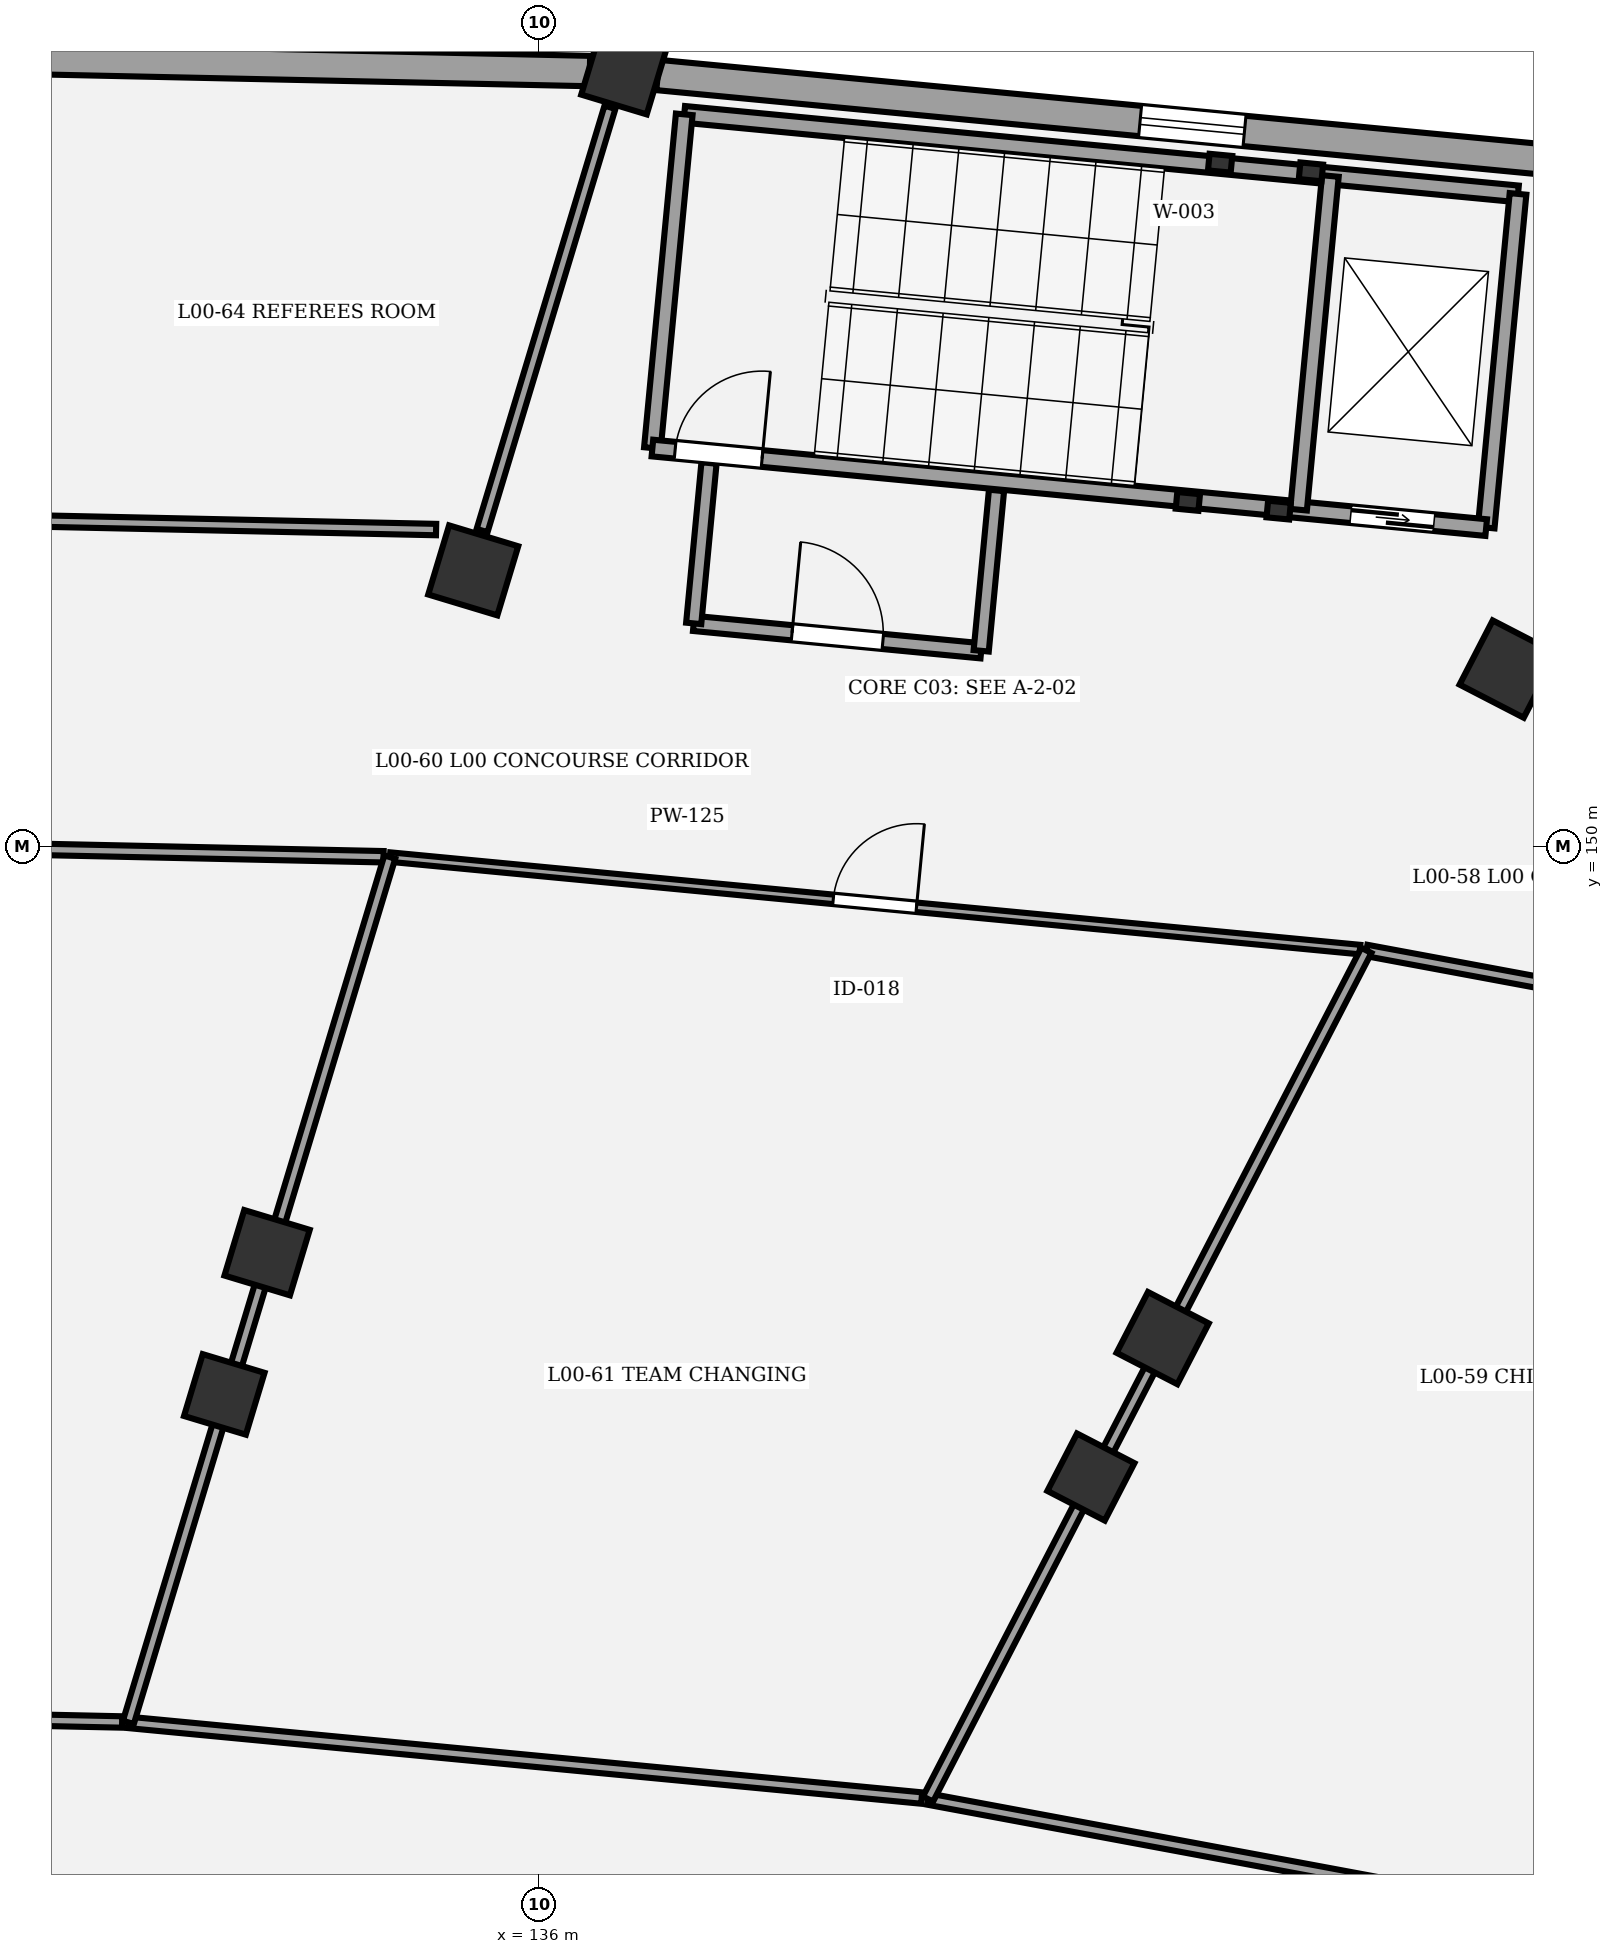
"""IFC4 building model, lengths in metres.
Left out: names, types, materials, properties, quantities, classifications, styles, units other than length and angle.
Written with IfcOpenShell. Run it as: python <this file> out.ifc"""

import sys

from ifc_helpers import new_model, si_unit, direction, frame, frame_2d, origin, origin_2d, place, context, subcontext, project, spatial, rectangle, extrude, element, fill, save


model = new_model("IFC4")
c1 = context("Model", 3, precision=1e-05, world=origin(), true_north=direction((0.0, 1.0)))
c2 = subcontext(c1, "Body", "Model", "MODEL_VIEW")
j1 = project(units=[si_unit("LENGTHUNIT", "METRE"), si_unit("PLANEANGLEUNIT", "RADIAN")], contexts=[c1])
p1 = place(None, origin())
s1 = spatial("IfcSite", under=j1, at=p1, CompositionType="ELEMENT")
p2 = place(p1, origin())
s2 = spatial("IfcBuilding", under=s1, at=p2, CompositionType="ELEMENT")
p3 = place(p2, origin())
s3 = spatial("IfcBuildingStorey", under=s2, at=p3, CompositionType="ELEMENT", Elevation=0.0)
p4 = place(p3, frame((143.259, 141.706, 0.0), z_axis=(0.0, 0.0, 1.0), x_axis=(0.458959712465, 0.888457079624, 0.0)))
e1 = element("IfcColumn", 1, at=p4, inside=s3, PredefinedType="COLUMN", context=c2, shape_type="SweptSolid", body=[
    extrude(rectangle(XDim=0.85, YDim=0.85, at=origin_2d()), origin(), (0.0, 0.0, 1.0), 5.4),
])
p5 = place(p3, frame((144.204, 143.534, 0.0), z_axis=(0.0, 0.0, 1.0), x_axis=(0.458959712465, 0.888457079624, 0.0)))
e2 = element("IfcColumn", 2, at=p5, inside=s3, PredefinedType="COLUMN", context=c2, shape_type="SweptSolid", body=[
    extrude(rectangle(XDim=0.9, YDim=0.9, at=origin_2d()), origin(), (0.0, 0.0, 1.0), 5.4),
])
p6 = place(p3, frame((148.75, 152.335, 0.0), z_axis=(0.0, 0.0, 1.0), x_axis=(0.458959712465, 0.888457079624, 0.0)))
e3 = element("IfcColumn", 3, at=p6, inside=s3, PredefinedType="COLUMN", context=c2, shape_type="SweptSolid", body=[
    extrude(rectangle(XDim=0.95, YDim=0.95, at=origin_2d()), origin(), (0.0, 0.0, 1.0), 5.4),
])
p7 = place(p3, frame((131.857, 142.793, 0.0), z_axis=(0.0, 0.0, 1.0), x_axis=(0.289198876314, 0.957269037387, 0.0)))
e4 = element("IfcColumn", 4, at=p7, inside=s3, PredefinedType="COLUMN", context=c2, shape_type="SweptSolid", body=[
    extrude(rectangle(XDim=0.85, YDim=0.85, at=origin_2d()), origin(), (0.0, 0.0, 1.0), 5.4),
])
p8 = place(p3, frame((132.42, 144.657, 0.0), z_axis=(0.0, 0.0, 1.0), x_axis=(0.289198876314, 0.957269037387, 0.0)))
e5 = element("IfcColumn", 5, at=p8, inside=s3, PredefinedType="COLUMN", context=c2, shape_type="SweptSolid", body=[
    extrude(rectangle(XDim=0.9, YDim=0.9, at=origin_2d()), origin(), (0.0, 0.0, 1.0), 5.4),
])
p9 = place(p3, frame((135.133, 153.634, 0.0), z_axis=(0.0, 0.0, 1.0), x_axis=(0.289198876314, 0.957269037387, 0.0)))
e6 = element("IfcColumn", 6, at=p9, inside=s3, PredefinedType="COLUMN", context=c2, shape_type="SweptSolid", body=[
    extrude(rectangle(XDim=0.95, YDim=0.95, at=origin_2d()), origin(), (0.0, 0.0, 1.0), 5.4),
])
p10 = place(p3, frame((137.115, 160.194, 0.0), z_axis=(0.0, 0.0, 1.0), x_axis=(0.289198876314, 0.957269037387, 0.0)))
e7 = element("IfcColumn", 7, at=p10, inside=s3, PredefinedType="COLUMN", context=c2, shape_type="SweptSolid", body=[
    extrude(rectangle(XDim=0.9, YDim=0.9, at=origin_2d()), origin(), (0.0, 0.0, 1.0), 5.4),
])
p11 = place(p3, frame((137.561, 160.151, 0.0), z_axis=(0.0, 0.0, 1.0), x_axis=(0.995482650467, -0.094943628644, 0.0)))
e8 = element("IfcWall", 8, at=p11, inside=s3, PredefinedType="STANDARD", context=c2, shape_type="SweptSolid", body=[
    extrude(rectangle(XDim=14.13, YDim=0.4, at=frame_2d((7.065, 0.0))), origin(), (0.0, 0.0, 1.0), 4.25),
])
p12 = place(p11, frame((6.375, 0.0, 1.1)))
e9 = element("IfcOpeningElement", 9, at=p12, cuts=e8, PredefinedType="OPENING", context=c2, shape_type="SweptSolid", body=[
    extrude(rectangle(XDim=1.38, YDim=1.55, at=frame_2d((0.69, 0.775))), frame((0.0, 0.21, 0.0), z_axis=(0.0, -1.0, 0.0), x_axis=(1.0, 0.0, 0.0)), (0.0, 0.0, 1.0), 0.42),
])
p13 = place(p3, frame((115.448, 160.66, 0.0), z_axis=(0.0, 0.0, 1.0), x_axis=(0.999768115817, -0.021534033422, 0.0)))
e10 = element("IfcWall", 10, at=p13, inside=s3, PredefinedType="STANDARD", context=c2, shape_type="SweptSolid", body=[
    extrude(rectangle(XDim=21.224, YDim=0.4, at=frame_2d((10.612, 0.0))), origin(), (0.0, 0.0, 1.0), 4.25),
])
p14 = place(p13, frame((9.012, 0.0, 0.0)))
e11 = element("IfcOpeningElement", 11, at=p14, cuts=e10, PredefinedType="OPENING", context=c2, shape_type="SweptSolid", body=[
    extrude(rectangle(XDim=3.2, YDim=3.1, at=frame_2d((1.6, 1.55))), frame((0.0, 0.21, 0.0), z_axis=(0.0, -1.0, 0.0), x_axis=(1.0, 0.0, 0.0)), (0.0, 0.0, 1.0), 0.42),
])
for number, where, z_axis, x_axis in (
    (12, (144.535, 154.541, 0.0), (0.0, 0.0, 1.0), (0.995, -0.095, 0.0)),
    (13, (145.73, 154.427, 0.0), (0.0, 0.0, 1.0), (0.995, -0.095, 0.0)),
    (14, (146.154, 158.877, 0.0), (0.0, 0.0, 1.0), (0.995, -0.095, 0.0)),
    (15, (144.96, 158.991, 0.0), (0.0, 0.0, 1.0), (0.995, -0.095, 0.0)),
):
    element("IfcColumn", number, at=place(p3, frame(where, z_axis=z_axis, x_axis=x_axis)), inside=s3, PredefinedType="COLUMN", context=c2, shape_type="SweptSolid", body=[
        extrude(rectangle(XDim=0.3, YDim=0.22, at=origin_2d()), origin(), (0.0, 0.0, 1.0), 5.4),
    ])
p15 = place(p3, frame((137.909, 159.634, 0.0), z_axis=(0.0, 0.0, 1.0), x_axis=(0.99547962713, -0.094975322952, 0.0)))
e16 = element("IfcWall", 16, at=p15, inside=s3, PredefinedType="SHEAR", context=c2, shape_type="SweptSolid", body=[
    extrude(rectangle(XDim=11.02, YDim=0.22, at=frame_2d((5.51, 0.0))), origin(), (0.0, 0.0, 1.0), 5.15),
])
p16 = place(p3, frame((137.49, 155.243, 0.0), z_axis=(0.0, 0.0, 1.0), x_axis=(0.094997189401, 0.995477540684, 0.0)))
e17 = element("IfcWall", 17, at=p16, inside=s3, PredefinedType="SHEAR", context=c2, shape_type="SweptSolid", body=[
    extrude(rectangle(XDim=4.41, YDim=0.22, at=frame_2d((2.205, 0.0))), origin(), (0.0, 0.0, 1.0), 5.15),
])
p17 = place(p3, frame((148.46, 154.197, 0.0), z_axis=(0.0, 0.0, 1.0), x_axis=(0.095002424918, 0.995477041051, 0.0)))
e18 = element("IfcWall", 18, at=p17, inside=s3, PredefinedType="SHEAR", context=c2, shape_type="SweptSolid", body=[
    extrude(rectangle(XDim=4.41, YDim=0.22, at=frame_2d((2.205, 0.0))), origin(), (0.0, 0.0, 1.0), 5.15),
])
p18 = place(p3, frame((137.49, 155.243, 0.0), z_axis=(0.0, 0.0, 1.0), x_axis=(0.995481721489, -0.094953368458, 0.0)))
e19 = element("IfcWall", 19, at=p18, inside=s3, PredefinedType="SHEAR", context=c2, shape_type="SweptSolid", body=[
    extrude(rectangle(XDim=11.02, YDim=0.22, at=frame_2d((5.51, 0.0))), origin(), (0.0, 0.0, 1.0), 5.15),
])
p19 = place(p18, frame((0.3, 0.0, 0.0)))
e20 = element("IfcOpeningElement", 20, at=p19, cuts=e19, PredefinedType="OPENING", context=c2, shape_type="SweptSolid", body=[
    extrude(rectangle(XDim=1.15, YDim=2.15, at=frame_2d((0.575, 1.075))), frame((0.0, 0.12, 0.0), z_axis=(0.0, -1.0, 0.0), x_axis=(1.0, 0.0, 0.0)), (0.0, 0.0, 1.0), 0.24),
])
p20 = place(p18, frame((9.23, 0.0, 0.0)))
e21 = element("IfcOpeningElement", 21, at=p20, cuts=e19, PredefinedType="OPENING", context=c2, shape_type="SweptSolid", body=[
    extrude(rectangle(XDim=1.1, YDim=2.15, at=frame_2d((0.55, 1.075))), frame((0.0, 0.12, 0.0), z_axis=(0.0, -1.0, 0.0), x_axis=(1.0, 0.0, 0.0)), (0.0, 0.0, 1.0), 0.24),
])
p21 = place(p3, frame((145.991, 154.432, 0.0), z_axis=(0.0, 0.0, 1.0), x_axis=(0.094997189401, 0.995477540684, 0.0)))
e22 = element("IfcWall", 22, at=p21, inside=s3, PredefinedType="SHEAR", context=c2, shape_type="SweptSolid", body=[
    extrude(rectangle(XDim=4.41, YDim=0.22, at=frame_2d((2.205, 0.0))), origin(), (0.0, 0.0, 1.0), 5.15),
])
p22 = place(p3, frame((138.033, 152.937, 0.0), z_axis=(0.0, 0.0, 1.0), x_axis=(0.995481022971, -0.094960691361, 0.0)))
e23 = element("IfcWall", 23, at=p22, inside=s3, PredefinedType="PARTITIONING", context=c2, shape_type="SweptSolid", body=[
    extrude(rectangle(XDim=3.8, YDim=0.2, at=frame_2d((1.9, 0.0))), origin(), (0.0, 0.0, 1.0), 4.25),
])
p23 = place(p22, frame((1.3, 0.0, 0.0)))
e24 = element("IfcOpeningElement", 24, at=p23, cuts=e23, PredefinedType="OPENING", context=c2, shape_type="SweptSolid", body=[
    extrude(rectangle(XDim=1.2, YDim=2.18, at=frame_2d((0.6, 1.09))), frame((0.0, 0.11, 0.0), z_axis=(0.0, -1.0, 0.0), x_axis=(1.0, 0.0, 0.0)), (0.0, 0.0, 1.0), 0.22),
])
for number, where, z_axis, x_axis in (
    (25, (138.033, 152.937, 0.0), (0.0, 0.0, 1.0), (0.095, 0.995, 0.0)),
    (26, (141.816, 152.576, 0.0), (0.0, 0.0, 1.0), (0.095, 0.995, 0.0)),
):
    element("IfcWall", number, at=place(p3, frame(where, z_axis=z_axis, x_axis=x_axis)), inside=s3, PredefinedType="PARTITIONING", context=c2, shape_type="SweptSolid", body=[
        extrude(rectangle(XDim=2.12, YDim=0.2, at=frame_2d((1.06, 0.0))), origin(), (0.0, 0.0, 1.0), 4.25),
    ])
p24 = place(p3, frame((146.884, 148.635, 0.0), z_axis=(0.0, 0.0, 1.0), x_axis=(0.983097372707, -0.183083466695, 0.0)))
e27 = element("IfcWall", 27, at=p24, inside=s3, PredefinedType="PARTITIONING", context=c2, shape_type="SweptSolid", body=[
    extrude(rectangle(XDim=11.035, YDim=0.15, at=frame_2d((5.517, 0.0))), origin(), (0.0, 0.0, 1.0), 4.15),
])
p25 = place(p24, frame((4.987, 0.0, 0.0)))
e28 = element("IfcOpeningElement", 28, at=p25, cuts=e27, PredefinedType="OPENING", context=c2, shape_type="SweptSolid", body=[
    extrude(rectangle(XDim=1.06, YDim=2.2, at=frame_2d((0.53, 1.1))), frame((0.0, 0.085, 0.0), z_axis=(0.0, -1.0, 0.0), x_axis=(1.0, 0.0, 0.0)), (0.0, 0.0, 1.0), 0.17),
])
p26 = place(p3, frame((134.035, 149.862, 0.0), z_axis=(0.0, 0.0, 1.0), x_axis=(0.995485111947, -0.094917816515, 0.0)))
e29 = element("IfcWall", 29, at=p26, inside=s3, PredefinedType="PARTITIONING", context=c2, shape_type="SweptSolid", body=[
    extrude(rectangle(XDim=12.822, YDim=0.125, at=frame_2d((6.411, 0.0))), origin(), (0.0, 0.0, 1.0), 4.15),
])
p27 = place(p26, frame((5.861, 0.0, 0.0)))
e30 = element("IfcOpeningElement", 30, at=p27, cuts=e29, PredefinedType="OPENING", context=c2, shape_type="SweptSolid", body=[
    extrude(rectangle(XDim=1.1, YDim=2.2, at=frame_2d((0.55, 1.1))), frame((0.0, 0.073, 0.0), z_axis=(0.0, -1.0, 0.0), x_axis=(1.0, 0.0, 0.0)), (0.0, 0.0, 1.0), 0.145),
])
p28 = place(p3, frame((115.04, 150.274, 0.0), z_axis=(0.0, 0.0, 1.0), x_axis=(0.999768266483, -0.021527037261, 0.0)))
e31 = element("IfcWall", 31, at=p28, inside=s3, PredefinedType="PARTITIONING", context=c2, shape_type="SweptSolid", body=[
    extrude(rectangle(XDim=18.917, YDim=0.15, at=frame_2d((9.458, 0.0))), origin(), (0.0, 0.0, 1.0), 4.15),
])
p29 = place(p28, frame((8.888, 0.0, 0.0)))
e32 = element("IfcOpeningElement", 32, at=p29, cuts=e31, PredefinedType="OPENING", context=c2, shape_type="SweptSolid", body=[
    extrude(rectangle(XDim=1.14, YDim=2.2, at=frame_2d((0.57, 1.1))), frame((0.0, 0.085, 0.0), z_axis=(0.0, -1.0, 0.0), x_axis=(1.0, 0.0, 0.0)), (0.0, 0.0, 1.0), 0.17),
])
p30 = place(p3, frame((134.644, 154.171, 0.0), z_axis=(0.0, 0.0, 1.0), x_axis=(-0.999768107727, 0.021534409017, 0.0)))
e33 = element("IfcWall", 33, at=p30, inside=s3, PredefinedType="PARTITIONING", context=c2, shape_type="SweptSolid", body=[
    extrude(rectangle(XDim=19.137, YDim=0.15, at=frame_2d((9.569, 0.0))), origin(), (0.0, 0.0, 1.0), 4.15),
])
p31 = place(p30, frame((8.979, 0.0, 0.0)))
e34 = element("IfcOpeningElement", 34, at=p31, cuts=e33, PredefinedType="OPENING", context=c2, shape_type="SweptSolid", body=[
    extrude(rectangle(XDim=1.18, YDim=2.2, at=frame_2d((0.59, 1.1))), frame((0.0, 0.085, 0.0), z_axis=(0.0, -1.0, 0.0), x_axis=(1.0, 0.0, 0.0)), (0.0, 0.0, 1.0), 0.17),
])
p32 = place(p3, frame((149.984, 135.818, 0.0), z_axis=(0.0, 0.0, 1.0), x_axis=(-0.983094830755, 0.183097115603, 0.0)))
e35 = element("IfcWall", 35, at=p32, inside=s3, PredefinedType="PARTITIONING", context=c2, shape_type="SweptSolid", body=[
    extrude(rectangle(XDim=9.021, YDim=0.15, at=frame_2d((4.51, 0.0))), origin(), (0.0, 0.0, 1.0), 4.15),
])
p33 = place(p3, frame((141.116, 137.47, 0.0), z_axis=(0.0, 0.0, 1.0), x_axis=(0.45894823356, 0.88846300931, 0.0)))
e36 = element("IfcWall", 36, at=p33, inside=s3, PredefinedType="PARTITIONING", context=c2, shape_type="SweptSolid", body=[
    extrude(rectangle(XDim=12.566, YDim=0.15, at=frame_2d((6.283, 0.0))), origin(), (0.0, 0.0, 1.0), 4.15),
])
p34 = place(p3, frame((141.033, 137.483, 0.0), z_axis=(0.0, 0.0, 1.0), x_axis=(-0.99548363917, 0.094933261529, 0.0)))
e37 = element("IfcWall", 37, at=p34, inside=s3, PredefinedType="PARTITIONING", context=c2, shape_type="SweptSolid", body=[
    extrude(rectangle(XDim=10.485, YDim=0.15, at=frame_2d((5.242, 0.0))), origin(), (0.0, 0.0, 1.0), 4.15),
])
p35 = place(p3, frame((130.595, 138.478, 0.0), z_axis=(0.0, 0.0, 1.0), x_axis=(0.289230709122, 0.957259419855, 0.0)))
e38 = element("IfcWall", 38, at=p35, inside=s3, PredefinedType="PARTITIONING", context=c2, shape_type="SweptSolid", body=[
    extrude(rectangle(XDim=11.893, YDim=0.15, at=frame_2d((5.946, 0.0))), origin(), (0.0, 0.0, 1.0), 4.15),
])
p36 = place(p3, frame((130.513, 138.483, 0.0), z_axis=(0.0, 0.0, 1.0), x_axis=(-0.999768149952, 0.021532448558, 0.0)))
e39 = element("IfcWall", 39, at=p36, inside=s3, PredefinedType="PARTITIONING", context=c2, shape_type="SweptSolid", body=[
    extrude(rectangle(XDim=15.477, YDim=0.15, at=frame_2d((7.738, 0.0))), origin(), (0.0, 0.0, 1.0), 4.15),
])
p37 = place(p3, frame((136.932, 159.727, 0.0), z_axis=(0.0, 0.0, 1.0), x_axis=(-0.289195444178, -0.957270074256, 0.0)))
e40 = element("IfcWall", 40, at=p37, inside=s3, PredefinedType="PARTITIONING", context=c2, shape_type="SweptSolid", body=[
    extrude(rectangle(XDim=5.817, YDim=0.15, at=frame_2d((2.909, 0.0))), origin(), (0.0, 0.0, 1.0), 4.15),
])
p38 = place(p12, origin())
e41 = element("IfcWindow", 41, at=p38, inside=s3, PartitioningType="SINGLE_PANEL", PredefinedType="WINDOW", context=c2, shape_type="SweptSolid", body=[
    extrude(rectangle(XDim=1.38, YDim=1.55, at=frame_2d((0.69, 0.775))), frame((0.0, 0.03, 0.0), z_axis=(0.0, -1.0, 0.0), x_axis=(1.0, 0.0, 0.0)), (0.0, 0.0, 1.0), 0.06),
])
fill(e9, e41)
p39 = place(p19, origin())
e42 = element("IfcDoor", 42, at=p39, inside=s3, OperationType="SINGLE_SWING_RIGHT", PredefinedType="DOOR", context=c2, shape_type="SweptSolid", body=[
    extrude(rectangle(XDim=1.15, YDim=2.15, at=frame_2d((0.575, 1.075))), frame((0.0, 0.025, 0.0), z_axis=(0.0, -1.0, 0.0), x_axis=(1.0, 0.0, 0.0)), (0.0, 0.0, 1.0), 0.05),
])
fill(e20, e42)
p40 = place(p20, origin())
e43 = element("IfcDoor", 43, at=p40, inside=s3, OperationType="DOUBLE_DOOR_SLIDING", PredefinedType="DOOR", context=c2, shape_type="SweptSolid", body=[
    extrude(rectangle(XDim=1.1, YDim=2.15, at=frame_2d((0.55, 1.075))), frame((0.0, 0.025, 0.0), z_axis=(0.0, -1.0, 0.0), x_axis=(1.0, 0.0, 0.0)), (0.0, 0.0, 1.0), 0.05),
])
fill(e21, e43)
p41 = place(p23, origin())
e44 = element("IfcDoor", 44, at=p41, inside=s3, OperationType="SINGLE_SWING_LEFT", PredefinedType="DOOR", context=c2, shape_type="SweptSolid", body=[
    extrude(rectangle(XDim=1.2, YDim=2.18, at=frame_2d((0.6, 1.09))), frame((0.0, 0.025, 0.0), z_axis=(0.0, -1.0, 0.0), x_axis=(1.0, 0.0, 0.0)), (0.0, 0.0, 1.0), 0.05),
])
fill(e24, e44)
p42 = place(p27, origin())
e45 = element("IfcDoor", 45, at=p42, inside=s3, OperationType="SINGLE_SWING_RIGHT", PredefinedType="DOOR", context=c2, shape_type="SweptSolid", body=[
    extrude(rectangle(XDim=1.1, YDim=2.2, at=frame_2d((0.55, 1.1))), frame((0.0, 0.025, 0.0), z_axis=(0.0, -1.0, 0.0), x_axis=(1.0, 0.0, 0.0)), (0.0, 0.0, 1.0), 0.05),
])
fill(e30, e45)
save(model, sys.argv[1])
